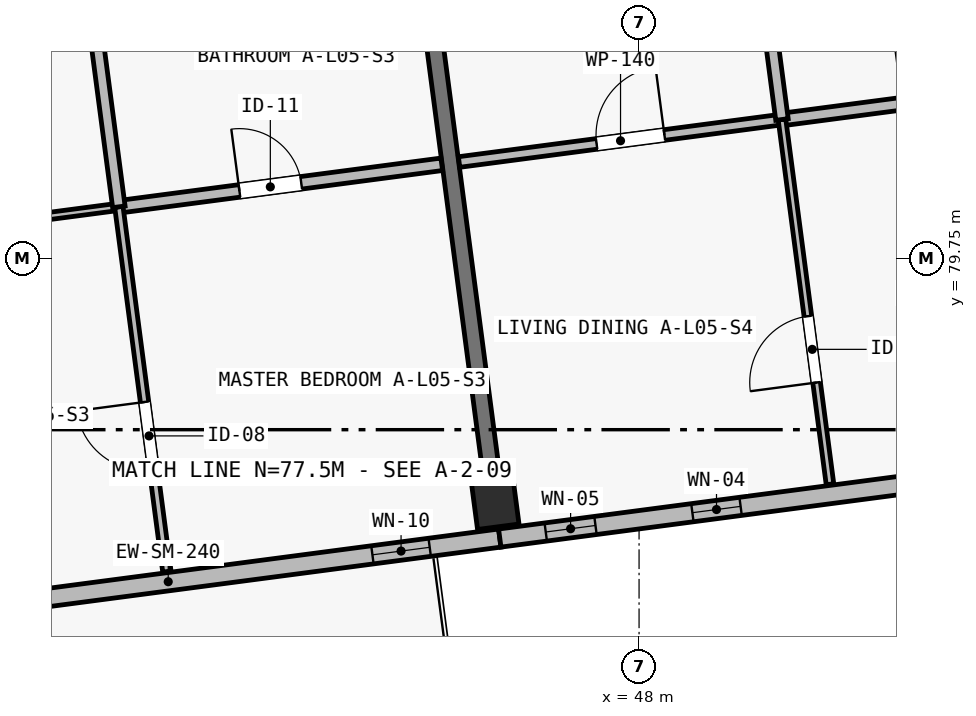
"""IFC4 building model, lengths in metres.
Left out: names, types, materials, properties, quantities, classifications, styles, units other than length and angle.
Written with IfcOpenShell. Run it as: python <this file> out.ifc"""

import sys

from ifc_helpers import new_model, si_unit, direction, frame, frame_2d, origin, origin_2d, place, context, subcontext, project, spatial, rectangle, extrude, element, fill, save


model = new_model("IFC4")
c1 = context("Model", 3, precision=1e-05, world=origin(), true_north=direction((0.0, 1.0)))
c2 = subcontext(c1, "Body", "Model", "MODEL_VIEW")
j1 = project(units=[si_unit("LENGTHUNIT", "METRE"), si_unit("PLANEANGLEUNIT", "RADIAN")], contexts=[c1])
p1 = place(None, origin())
s1 = spatial("IfcSite", under=j1, at=p1, CompositionType="ELEMENT")
p2 = place(p1, origin())
s2 = spatial("IfcBuilding", under=s1, at=p2, CompositionType="ELEMENT")
p3 = place(p2, frame((0.0, 0.0, 18.15)))
s3 = spatial("IfcBuildingStorey", under=s2, at=p3, CompositionType="ELEMENT", Elevation=18.15)
p4 = place(p3, frame((46.099, 76.594, 0.0), z_axis=(0.0, 0.0, 1.0), x_axis=(0.991444861374, 0.13052619222, 0.0)))
e1 = element("IfcColumn", 1, at=p4, inside=s3, PredefinedType="COLUMN", context=c2, shape_type="SweptSolid", body=[
    extrude(rectangle(XDim=0.55, YDim=0.75, at=origin_2d()), origin(), (0.0, 0.0, 1.0), 3.25),
])
p5 = place(p3, frame((46.05, 76.966, 0.0), z_axis=(0.0, 0.0, 1.0), x_axis=(-0.130519009654, 0.99144580695, 0.0)))
e2 = element("IfcWall", 2, at=p5, inside=s3, PredefinedType="SHEAR", context=c2, shape_type="SweptSolid", body=[
    extrude(rectangle(XDim=7.05, YDim=0.22, at=frame_2d((3.525, 0.0))), origin(), (0.0, 0.0, 1.0), 2.5),
])
p6 = place(p3, frame((46.167, 76.074, 0.0), z_axis=(0.0, 0.0, 1.0), x_axis=(-0.991444377792, -0.130529865336, 0.0)))
e3 = element("IfcWall", 3, at=p6, inside=s3, PredefinedType="SOLIDWALL", context=c2, shape_type="SweptSolid", body=[
    extrude(rectangle(XDim=8.8, YDim=0.24, at=frame_2d((4.4, 0.0))), origin(), (0.0, 0.0, 1.0), 3.0),
])
p7 = place(p6, frame((6.147, 0.0, 0.0)))
e4 = element("IfcOpeningElement", 4, at=p7, cuts=e3, PredefinedType="OPENING", context=c2, shape_type="SweptSolid", body=[
    extrude(rectangle(XDim=1.5, YDim=2.12, at=frame_2d((0.75, 1.06))), frame((0.0, 0.135, 0.0), z_axis=(0.0, -1.0, 0.0), x_axis=(1.0, 0.0, 0.0)), (0.0, 0.0, 1.0), 0.27),
])
p8 = place(p6, frame((0.93, 0.0, 0.5)))
e5 = element("IfcOpeningElement", 5, at=p8, cuts=e3, PredefinedType="OPENING", context=c2, shape_type="SweptSolid", body=[
    extrude(rectangle(XDim=0.76, YDim=2.34, at=frame_2d((0.38, 1.17))), frame((0.0, 0.135, 0.0), z_axis=(0.0, -1.0, 0.0), x_axis=(1.0, 0.0, 0.0)), (0.0, 0.0, 1.0), 0.27),
])
p9 = place(p3, frame((54.892, 77.223, 0.0), z_axis=(0.0, 0.0, 1.0), x_axis=(-0.991443905089, -0.130533455715, 0.0)))
e6 = element("IfcWall", 6, at=p9, inside=s3, PredefinedType="SOLIDWALL", context=c2, shape_type="SweptSolid", body=[
    extrude(rectangle(XDim=8.8, YDim=0.24, at=frame_2d((4.4, 0.0))), origin(), (0.0, 0.0, 1.0), 3.0),
])
p10 = place(p9, frame((2.293, 0.0, 0.42)))
e7 = element("IfcOpeningElement", 7, at=p10, cuts=e6, PredefinedType="OPENING", context=c2, shape_type="SweptSolid", body=[
    extrude(rectangle(XDim=0.58, YDim=2.16, at=frame_2d((0.29, 1.08))), frame((0.0, 0.135, 0.0), z_axis=(0.0, -1.0, 0.0), x_axis=(1.0, 0.0, 0.0)), (0.0, 0.0, 1.0), 0.27),
])
p11 = place(p9, frame((5.604, 0.0, 0.42)))
e8 = element("IfcOpeningElement", 8, at=p11, cuts=e6, PredefinedType="OPENING", context=c2, shape_type="SweptSolid", body=[
    extrude(rectangle(XDim=0.64, YDim=2.18, at=frame_2d((0.32, 1.09))), frame((0.0, 0.135, 0.0), z_axis=(0.0, -1.0, 0.0), x_axis=(1.0, 0.0, 0.0)), (0.0, 0.0, 1.0), 0.27),
])
p12 = place(p9, frame((7.53, 0.0, 0.48)))
e9 = element("IfcOpeningElement", 9, at=p12, cuts=e6, PredefinedType="OPENING", context=c2, shape_type="SweptSolid", body=[
    extrude(rectangle(XDim=0.66, YDim=2.32, at=frame_2d((0.33, 1.16))), frame((0.0, 0.135, 0.0), z_axis=(0.0, -1.0, 0.0), x_axis=(1.0, 0.0, 0.0)), (0.0, 0.0, 1.0), 0.27),
])
p13 = place(p3, frame((36.907, 79.873, 0.0), z_axis=(0.0, 0.0, 1.0), x_axis=(0.991444984965, 0.130525253451, 0.0)))
e10 = element("IfcWall", 10, at=p13, inside=s3, PredefinedType="PARTITIONING", context=c2, shape_type="SweptSolid", body=[
    extrude(rectangle(XDim=4.285, YDim=0.095, at=frame_2d((2.143, 0.0))), origin(), (0.0, 0.0, 1.0), 2.97),
])
p14 = place(p13, frame((1.825, 0.0, 0.0)))
e11 = element("IfcOpeningElement", 11, at=p14, cuts=e10, PredefinedType="OPENING", context=c2, shape_type="SweptSolid", body=[
    extrude(rectangle(XDim=0.9, YDim=2.1, at=frame_2d((0.45, 1.05))), frame((0.0, 0.062, 0.0), z_axis=(0.0, -1.0, 0.0), x_axis=(1.0, 0.0, 0.0)), (0.0, 0.0, 1.0), 0.125),
])
p15 = place(p3, frame((41.156, 80.432, 0.0), z_axis=(0.0, 0.0, 1.0), x_axis=(0.991444014242, 0.130532626667, 0.0)))
e12 = element("IfcWall", 12, at=p15, inside=s3, PredefinedType="PLUMBINGWALL", context=c2, shape_type="SweptSolid", body=[
    extrude(rectangle(XDim=4.285, YDim=0.165, at=frame_2d((2.143, 0.0))), origin(), (0.0, 0.0, 1.0), 2.97),
])
p16 = place(p15, frame((1.6, 0.0, 0.0)))
e13 = element("IfcOpeningElement", 13, at=p16, cuts=e12, PredefinedType="OPENING", context=c2, shape_type="SweptSolid", body=[
    extrude(rectangle(XDim=0.82, YDim=2.08, at=frame_2d((0.41, 1.04))), frame((0.0, 0.097, 0.0), z_axis=(0.0, -1.0, 0.0), x_axis=(1.0, 0.0, 0.0)), (0.0, 0.0, 1.0), 0.195),
])
p17 = place(p3, frame((41.787, 75.634, 0.0), z_axis=(0.0, 0.0, 1.0), x_axis=(-0.130494962676, 0.991448972321, 0.0)))
e14 = element("IfcWall", 14, at=p17, inside=s3, PredefinedType="PARTITIONING", context=c2, shape_type="SweptSolid", body=[
    extrude(rectangle(XDim=4.84, YDim=0.11, at=frame_2d((2.42, 0.0))), origin(), (0.0, 0.0, 1.0), 2.97),
])
p18 = place(p17, frame((1.35, 0.0, 0.0)))
e15 = element("IfcOpeningElement", 15, at=p18, cuts=e14, PredefinedType="OPENING", context=c2, shape_type="SweptSolid", body=[
    extrude(rectangle(XDim=0.9, YDim=2.1, at=frame_2d((0.45, 1.05))), frame((0.0, 0.07, 0.0), z_axis=(0.0, -1.0, 0.0), x_axis=(1.0, 0.0, 0.0)), (0.0, 0.0, 1.0), 0.14),
])
p19 = place(p3, frame((41.156, 80.432, 0.0), z_axis=(0.0, 0.0, 1.0), x_axis=(-0.130551670646, 0.991441506742, 0.0)))
e16 = element("IfcWall", 16, at=p19, inside=s3, PredefinedType="PLUMBINGWALL", context=c2, shape_type="SweptSolid", body=[
    extrude(rectangle(XDim=3.77, YDim=0.165, at=frame_2d((1.885, 0.0))), origin(), (0.0, 0.0, 1.0), 2.97),
])
p20 = place(p3, frame((45.632, 81.021, 0.0), z_axis=(0.0, 0.0, 1.0), x_axis=(0.991444014242, 0.130532626667, 0.0)))
e17 = element("IfcWall", 17, at=p20, inside=s3, PredefinedType="PARTITIONING", context=c2, shape_type="SweptSolid", body=[
    extrude(rectangle(XDim=4.285, YDim=0.14, at=frame_2d((2.143, 0.0))), origin(), (0.0, 0.0, 1.0), 2.97),
])
p21 = place(p20, frame((1.825, 0.0, 0.0)))
e18 = element("IfcOpeningElement", 18, at=p21, cuts=e17, PredefinedType="OPENING", context=c2, shape_type="SweptSolid", body=[
    extrude(rectangle(XDim=0.9, YDim=2.1, at=frame_2d((0.45, 1.05))), frame((0.0, 0.085, 0.0), z_axis=(0.0, -1.0, 0.0), x_axis=(1.0, 0.0, 0.0)), (0.0, 0.0, 1.0), 0.17),
])
p22 = place(p3, frame((49.88, 81.581, 0.0), z_axis=(0.0, 0.0, 1.0), x_axis=(0.991444014242, 0.130532626667, 0.0)))
e19 = element("IfcWall", 19, at=p22, inside=s3, PredefinedType="PLUMBINGWALL", context=c2, shape_type="SweptSolid", body=[
    extrude(rectangle(XDim=4.285, YDim=0.165, at=frame_2d((2.143, 0.0))), origin(), (0.0, 0.0, 1.0), 2.97),
])
p23 = place(p22, frame((1.6, 0.0, 0.0)))
e20 = element("IfcOpeningElement", 20, at=p23, cuts=e19, PredefinedType="OPENING", context=c2, shape_type="SweptSolid", body=[
    extrude(rectangle(XDim=0.82, YDim=2.08, at=frame_2d((0.41, 1.04))), frame((0.0, 0.097, 0.0), z_axis=(0.0, -1.0, 0.0), x_axis=(1.0, 0.0, 0.0)), (0.0, 0.0, 1.0), 0.195),
])
p24 = place(p3, frame((50.512, 76.782, 0.0), z_axis=(0.0, 0.0, 1.0), x_axis=(-0.130544545786, 0.991442444908, 0.0)))
e21 = element("IfcWall", 21, at=p24, inside=s3, PredefinedType="PARTITIONING", context=c2, shape_type="SweptSolid", body=[
    extrude(rectangle(XDim=4.84, YDim=0.1, at=frame_2d((2.42, 0.0))), origin(), (0.0, 0.0, 1.0), 2.97),
])
p25 = place(p24, frame((1.35, 0.0, 0.0)))
e22 = element("IfcOpeningElement", 22, at=p25, cuts=e21, PredefinedType="OPENING", context=c2, shape_type="SweptSolid", body=[
    extrude(rectangle(XDim=0.88, YDim=2.1, at=frame_2d((0.44, 1.05))), frame((0.0, 0.065, 0.0), z_axis=(0.0, -1.0, 0.0), x_axis=(1.0, 0.0, 0.0)), (0.0, 0.0, 1.0), 0.13),
])
p26 = place(p3, frame((49.88, 81.581, 0.0), z_axis=(0.0, 0.0, 1.0), x_axis=(-0.130551670646, 0.991441506742, 0.0)))
e23 = element("IfcWall", 23, at=p26, inside=s3, PredefinedType="PLUMBINGWALL", context=c2, shape_type="SweptSolid", body=[
    extrude(rectangle(XDim=3.77, YDim=0.165, at=frame_2d((1.885, 0.0))), origin(), (0.0, 0.0, 1.0), 2.97),
])
p27 = place(p8, origin())
e24 = element("IfcWindow", 24, at=p27, inside=s3, PartitioningType="SINGLE_PANEL", PredefinedType="WINDOW", context=c2, shape_type="SweptSolid", body=[
    extrude(rectangle(XDim=0.76, YDim=2.34, at=frame_2d((0.38, 1.17))), frame((0.0, 0.03, 0.0), z_axis=(0.0, -1.0, 0.0), x_axis=(1.0, 0.0, 0.0)), (0.0, 0.0, 1.0), 0.06),
])
fill(e5, e24)
p28 = place(p11, origin())
e25 = element("IfcWindow", 25, at=p28, inside=s3, PartitioningType="SINGLE_PANEL", PredefinedType="WINDOW", context=c2, shape_type="SweptSolid", body=[
    extrude(rectangle(XDim=0.64, YDim=2.18, at=frame_2d((0.32, 1.09))), frame((0.0, 0.03, 0.0), z_axis=(0.0, -1.0, 0.0), x_axis=(1.0, 0.0, 0.0)), (0.0, 0.0, 1.0), 0.06),
])
fill(e8, e25)
p29 = place(p12, origin())
e26 = element("IfcWindow", 26, at=p29, inside=s3, PartitioningType="SINGLE_PANEL", PredefinedType="WINDOW", context=c2, shape_type="SweptSolid", body=[
    extrude(rectangle(XDim=0.66, YDim=2.32, at=frame_2d((0.33, 1.16))), frame((0.0, 0.03, 0.0), z_axis=(0.0, -1.0, 0.0), x_axis=(1.0, 0.0, 0.0)), (0.0, 0.0, 1.0), 0.06),
])
fill(e9, e26)
p30 = place(p16, origin())
e27 = element("IfcDoor", 27, at=p30, inside=s3, OperationType="SINGLE_SWING_LEFT", PredefinedType="DOOR", context=c2, shape_type="SweptSolid", body=[
    extrude(rectangle(XDim=0.82, YDim=2.08, at=frame_2d((0.41, 1.04))), frame((0.0, 0.025, 0.0), z_axis=(0.0, -1.0, 0.0), x_axis=(1.0, 0.0, 0.0)), (0.0, 0.0, 1.0), 0.05),
])
fill(e13, e27)
p31 = place(p18, origin())
e28 = element("IfcDoor", 28, at=p31, inside=s3, OperationType="SINGLE_SWING_RIGHT", PredefinedType="DOOR", context=c2, shape_type="SweptSolid", body=[
    extrude(rectangle(XDim=0.9, YDim=2.1, at=frame_2d((0.45, 1.05))), frame((0.0, 0.025, 0.0), z_axis=(0.0, -1.0, 0.0), x_axis=(1.0, 0.0, 0.0)), (0.0, 0.0, 1.0), 0.05),
])
fill(e15, e28)
p32 = place(p21, origin())
e29 = element("IfcDoor", 29, at=p32, inside=s3, OperationType="SINGLE_SWING_RIGHT", PredefinedType="DOOR", context=c2, shape_type="SweptSolid", body=[
    extrude(rectangle(XDim=0.9, YDim=2.1, at=frame_2d((0.45, 1.05))), frame((0.0, 0.025, 0.0), z_axis=(0.0, -1.0, 0.0), x_axis=(1.0, 0.0, 0.0)), (0.0, 0.0, 1.0), 0.05),
])
fill(e18, e29)
p33 = place(p25, origin())
e30 = element("IfcDoor", 30, at=p33, inside=s3, OperationType="SINGLE_SWING_LEFT", PredefinedType="DOOR", context=c2, shape_type="SweptSolid", body=[
    extrude(rectangle(XDim=0.88, YDim=2.1, at=frame_2d((0.44, 1.05))), frame((0.0, 0.025, 0.0), z_axis=(0.0, -1.0, 0.0), x_axis=(1.0, 0.0, 0.0)), (0.0, 0.0, 1.0), 0.05),
])
fill(e22, e30)
save(model, sys.argv[1])
